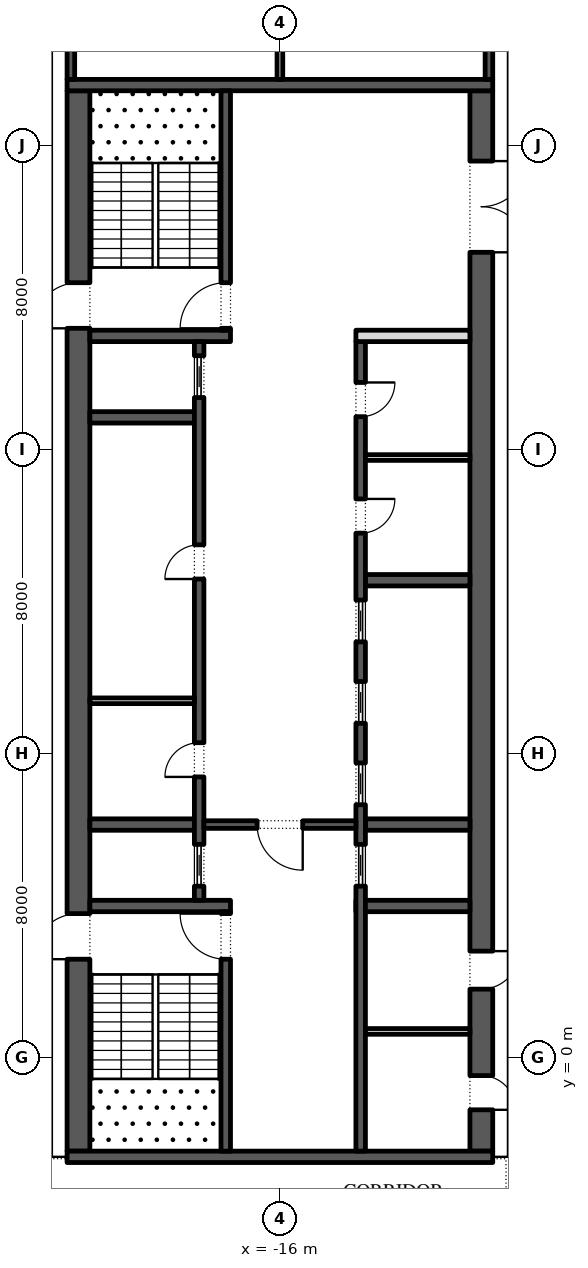
"""IFC4 building model, lengths in metres.
Left out: names, types, materials, properties, quantities, classifications, styles, units other than length and angle.
Written with IfcOpenShell. Run it as: python <this file> out.ifc"""

import sys

from ifc_helpers import new_model, si_unit, direction, frame, frame_2d, origin, place, context, subcontext, project, spatial, rectangle, extrude, element, fill, save


model = new_model("IFC4")
c1 = context("Model", 3, precision=1e-05, world=origin(), true_north=direction((0.0, 1.0)))
c2 = subcontext(c1, "Body", "Model", "MODEL_VIEW")
j1 = project(units=[si_unit("LENGTHUNIT", "METRE"), si_unit("PLANEANGLEUNIT", "RADIAN")], contexts=[c1])
p1 = place(None, origin())
s1 = spatial("IfcSite", under=j1, at=p1, CompositionType="ELEMENT")
p2 = place(p1, origin())
s2 = spatial("IfcBuilding", under=s1, at=p2, CompositionType="ELEMENT")
p3 = place(p2, frame((0.0, 0.0, 293.4)))
s3 = spatial("IfcBuildingStorey", under=s2, at=p3, CompositionType="ELEMENT", Elevation=293.4)
p4 = place(p3, frame((-21.3, -2.45, 0.0), z_axis=(0.0, 0.0, 1.0), x_axis=(0.0, 1.0, 0.0)))
e1 = element("IfcWall", 1, at=p4, inside=s3, PredefinedType="SHEAR", context=c2, shape_type="SweptSolid", body=[
    extrude(rectangle(XDim=27.9, YDim=0.6, at=frame_2d((13.95, 0.0))), origin(), (0.0, 0.0, 1.0), 3.75),
])
p5 = place(p4, frame((5.05, 0.0, 0.0)))
e2 = element("IfcOpeningElement", 2, at=p5, cuts=e1, PredefinedType="OPENING", context=c2, shape_type="SweptSolid", body=[
    extrude(rectangle(XDim=1.2, YDim=2.1, at=frame_2d((0.6, 1.05))), frame((0.0, 0.31, 0.0), z_axis=(0.0, -1.0, 0.0), x_axis=(1.0, 0.0, 0.0)), (0.0, 0.0, 1.0), 0.62),
])
p6 = place(p4, frame((21.65, 0.0, 0.0)))
e3 = element("IfcOpeningElement", 3, at=p6, cuts=e1, PredefinedType="OPENING", context=c2, shape_type="SweptSolid", body=[
    extrude(rectangle(XDim=1.2, YDim=2.1, at=frame_2d((0.6, 1.05))), frame((0.0, 0.31, 0.0), z_axis=(0.0, -1.0, 0.0), x_axis=(1.0, 0.0, 0.0)), (0.0, 0.0, 1.0), 0.62),
])
p7 = place(p3, frame((-10.7, -2.45, 0.0), z_axis=(0.0, 0.0, 1.0), x_axis=(0.0, 1.0, 0.0)))
e4 = element("IfcWall", 4, at=p7, inside=s3, PredefinedType="SHEAR", context=c2, shape_type="SweptSolid", body=[
    extrude(rectangle(XDim=27.9, YDim=0.6, at=frame_2d((13.95, 0.0))), origin(), (0.0, 0.0, 1.0), 3.75),
])
p8 = place(p7, frame((23.65, 0.0, 0.0)))
e5 = element("IfcOpeningElement", 5, at=p8, cuts=e4, PredefinedType="OPENING", context=c2, shape_type="SweptSolid", body=[
    extrude(rectangle(XDim=2.4, YDim=2.1, at=frame_2d((1.2, 1.05))), frame((0.0, 0.31, 0.0), z_axis=(0.0, -1.0, 0.0), x_axis=(1.0, 0.0, 0.0)), (0.0, 0.0, 1.0), 0.62),
])
p9 = place(p7, frame((1.087, 0.0, 0.0)))
e6 = element("IfcOpeningElement", 6, at=p9, cuts=e4, PredefinedType="OPENING", context=c2, shape_type="SweptSolid", body=[
    extrude(rectangle(XDim=0.9, YDim=2.1, at=frame_2d((0.45, 1.05))), frame((0.0, 0.31, 0.0), z_axis=(0.0, -1.0, 0.0), x_axis=(1.0, 0.0, 0.0)), (0.0, 0.0, 1.0), 0.62),
])
p10 = place(p7, frame((4.262, 0.0, 0.0)))
e7 = element("IfcOpeningElement", 7, at=p10, cuts=e4, PredefinedType="OPENING", context=c2, shape_type="SweptSolid", body=[
    extrude(rectangle(XDim=1.0, YDim=2.1, at=frame_2d((0.5, 1.05))), frame((0.0, 0.31, 0.0), z_axis=(0.0, -1.0, 0.0), x_axis=(1.0, 0.0, 0.0)), (0.0, 0.0, 1.0), 0.62),
])
for number, where, z_axis, x_axis in (
    (8, (-21.6, -2.6, 0.0), (0.0, 0.0, 1.0), (1.0, 0.0, 0.0)),
    (9, (-21.6, 25.6, 0.0), (0.0, 0.0, 1.0), (1.0, 0.0, 0.0)),
):
    element("IfcWall", number, at=place(p3, frame(where, z_axis=z_axis, x_axis=x_axis)), inside=s3, PredefinedType="SHEAR", context=c2, shape_type="SweptSolid", body=[
        extrude(rectangle(XDim=11.2, YDim=0.3, at=frame_2d((5.6, 0.0))), origin(), (0.0, 0.0, 1.0), 3.75),
    ])
p11 = place(p3, frame((-21.0, 4.0, 0.0), z_axis=(0.0, 0.0, 1.0), x_axis=(1.0, 0.0, 0.0)))
e10 = element("IfcWall", 10, at=p11, inside=s3, PredefinedType="SHEAR", context=c2, shape_type="SweptSolid", body=[
    extrude(rectangle(XDim=3.7, YDim=0.3, at=frame_2d((1.85, 0.0))), origin(), (0.0, 0.0, 1.0), 3.75),
])
p12 = place(p3, frame((-17.425, -2.45, 0.0), z_axis=(0.0, 0.0, 1.0), x_axis=(0.0, 1.0, 0.0)))
e11 = element("IfcWall", 11, at=p12, inside=s3, PredefinedType="SHEAR", context=c2, shape_type="SweptSolid", body=[
    extrude(rectangle(XDim=6.3, YDim=0.25, at=frame_2d((3.15, 0.0))), origin(), (0.0, 0.0, 1.0), 3.75),
])
p13 = place(p12, frame((5.05, 0.0, 0.0)))
e12 = element("IfcOpeningElement", 12, at=p13, cuts=e11, PredefinedType="OPENING", context=c2, shape_type="SweptSolid", body=[
    extrude(rectangle(XDim=1.2, YDim=2.1, at=frame_2d((0.6, 1.05))), frame((0.0, 0.135, 0.0), z_axis=(0.0, -1.0, 0.0), x_axis=(1.0, 0.0, 0.0)), (0.0, 0.0, 1.0), 0.27),
])
p14 = place(p3, frame((-21.0, 19.0, 0.0), z_axis=(0.0, 0.0, 1.0), x_axis=(1.0, 0.0, 0.0)))
e13 = element("IfcWall", 13, at=p14, inside=s3, PredefinedType="SHEAR", context=c2, shape_type="SweptSolid", body=[
    extrude(rectangle(XDim=3.7, YDim=0.3, at=frame_2d((1.85, 0.0))), origin(), (0.0, 0.0, 1.0), 3.75),
])
p15 = place(p3, frame((-17.425, 19.15, 0.0), z_axis=(0.0, 0.0, 1.0), x_axis=(0.0, 1.0, 0.0)))
e14 = element("IfcWall", 14, at=p15, inside=s3, PredefinedType="SHEAR", context=c2, shape_type="SweptSolid", body=[
    extrude(rectangle(XDim=6.3, YDim=0.25, at=frame_2d((3.15, 0.0))), origin(), (0.0, 0.0, 1.0), 3.75),
])
p16 = place(p15, frame((0.05, 0.0, 0.0)))
e15 = element("IfcOpeningElement", 15, at=p16, cuts=e14, PredefinedType="OPENING", context=c2, shape_type="SweptSolid", body=[
    extrude(rectangle(XDim=1.2, YDim=2.1, at=frame_2d((0.6, 1.05))), frame((0.0, 0.135, 0.0), z_axis=(0.0, -1.0, 0.0), x_axis=(1.0, 0.0, 0.0)), (0.0, 0.0, 1.0), 0.27),
])
for number, where, z_axis, x_axis in (
    (16, (-21.0, 6.143, 0.0), (0.0, 0.0, 1.0), (1.0, 0.0, 0.0)),
    (17, (-21.0, 16.857, 0.0), (0.0, 0.0, 1.0), (1.0, 0.0, 0.0)),
):
    element("IfcWall", number, at=place(p3, frame(where, z_axis=z_axis, x_axis=x_axis)), inside=s3, PredefinedType="SHEAR", context=c2, shape_type="SweptSolid", body=[
        extrude(rectangle(XDim=2.75, YDim=0.3, at=frame_2d((1.375, 0.0))), origin(), (0.0, 0.0, 1.0), 3.75),
    ])
p17 = place(p3, frame((-18.125, 4.15, 0.0), z_axis=(0.0, 0.0, 1.0), x_axis=(0.0, 1.0, 0.0)))
e18 = element("IfcWall", 18, at=p17, inside=s3, PredefinedType="SHEAR", context=c2, shape_type="SweptSolid", body=[
    extrude(rectangle(XDim=14.7, YDim=0.25, at=frame_2d((7.35, 0.0))), origin(), (0.0, 0.0, 1.0), 3.75),
])
p18 = place(p17, frame((3.246, 0.0, 0.0)))
e19 = element("IfcOpeningElement", 19, at=p18, cuts=e18, PredefinedType="OPENING", context=c2, shape_type="SweptSolid", body=[
    extrude(rectangle(XDim=0.9, YDim=2.1, at=frame_2d((0.45, 1.05))), frame((0.0, 0.135, 0.0), z_axis=(0.0, -1.0, 0.0), x_axis=(1.0, 0.0, 0.0)), (0.0, 0.0, 1.0), 0.27),
])
p19 = place(p17, frame((8.454, 0.0, 0.0)))
e20 = element("IfcOpeningElement", 20, at=p19, cuts=e18, PredefinedType="OPENING", context=c2, shape_type="SweptSolid", body=[
    extrude(rectangle(XDim=0.9, YDim=2.1, at=frame_2d((0.45, 1.05))), frame((0.0, 0.135, 0.0), z_axis=(0.0, -1.0, 0.0), x_axis=(1.0, 0.0, 0.0)), (0.0, 0.0, 1.0), 0.27),
])
p20 = place(p17, frame((0.371, 0.0, 0.0)))
e21 = element("IfcOpeningElement", 21, at=p20, cuts=e18, PredefinedType="OPENING", context=c2, shape_type="SweptSolid", body=[
    extrude(rectangle(XDim=1.1, YDim=2.1, at=frame_2d((0.55, 1.05))), frame((0.0, 0.135, 0.0), z_axis=(0.0, -1.0, 0.0), x_axis=(1.0, 0.0, 0.0)), (0.0, 0.0, 1.0), 0.27),
])
p21 = place(p17, frame((13.229, 0.0, 0.0)))
e22 = element("IfcOpeningElement", 22, at=p21, cuts=e18, PredefinedType="OPENING", context=c2, shape_type="SweptSolid", body=[
    extrude(rectangle(XDim=1.1, YDim=2.1, at=frame_2d((0.55, 1.05))), frame((0.0, 0.135, 0.0), z_axis=(0.0, -1.0, 0.0), x_axis=(1.0, 0.0, 0.0)), (0.0, 0.0, 1.0), 0.27),
])
p22 = place(p3, frame((-21.0, 9.4, 0.0), z_axis=(0.0, 0.0, 1.0), x_axis=(1.0, 0.0, 0.0)))
e23 = element("IfcWall", 23, at=p22, inside=s3, PredefinedType="PARTITIONING", context=c2, shape_type="SweptSolid", body=[
    extrude(rectangle(XDim=2.75, YDim=0.15, at=frame_2d((1.375, 0.0))), origin(), (0.0, 0.0, 1.0), 3.75),
])
p23 = place(p3, frame((-14.0, 4.0, 0.0), z_axis=(0.0, 0.0, 1.0), x_axis=(1.0, 0.0, 0.0)))
e24 = element("IfcWall", 24, at=p23, inside=s3, PredefinedType="SHEAR", context=c2, shape_type="SweptSolid", body=[
    extrude(rectangle(XDim=3.0, YDim=0.3, at=frame_2d((1.5, 0.0))), origin(), (0.0, 0.0, 1.0), 3.75),
])
for number, where, z_axis, x_axis in (
    (25, (-13.75, 6.143, 0.0), (0.0, 0.0, 1.0), (1.0, 0.0, 0.0)),
    (26, (-13.75, 12.571, 0.0), (0.0, 0.0, 1.0), (1.0, 0.0, 0.0)),
):
    element("IfcWall", number, at=place(p3, frame(where, z_axis=z_axis, x_axis=x_axis)), inside=s3, PredefinedType="SHEAR", context=c2, shape_type="SweptSolid", body=[
        extrude(rectangle(XDim=2.75, YDim=0.3, at=frame_2d((1.375, 0.0))), origin(), (0.0, 0.0, 1.0), 3.75),
    ])
p24 = place(p3, frame((-13.875, -2.45, 0.0), z_axis=(0.0, 0.0, 1.0), x_axis=(0.0, 1.0, 0.0)))
e27 = element("IfcWall", 27, at=p24, inside=s3, PredefinedType="SHEAR", context=c2, shape_type="SweptSolid", body=[
    extrude(rectangle(XDim=21.3, YDim=0.25, at=frame_2d((10.65, 0.0))), origin(), (0.0, 0.0, 1.0), 3.75),
])
p25 = place(p24, frame((16.261, 0.0, 0.0)))
e28 = element("IfcOpeningElement", 28, at=p25, cuts=e27, PredefinedType="OPENING", context=c2, shape_type="SweptSolid", body=[
    extrude(rectangle(XDim=0.9, YDim=2.1, at=frame_2d((0.45, 1.05))), frame((0.0, 0.135, 0.0), z_axis=(0.0, -1.0, 0.0), x_axis=(1.0, 0.0, 0.0)), (0.0, 0.0, 1.0), 0.27),
])
p26 = place(p24, frame((19.325, 0.0, 0.0)))
e29 = element("IfcOpeningElement", 29, at=p26, cuts=e27, PredefinedType="OPENING", context=c2, shape_type="SweptSolid", body=[
    extrude(rectangle(XDim=0.9, YDim=2.1, at=frame_2d((0.45, 1.05))), frame((0.0, 0.135, 0.0), z_axis=(0.0, -1.0, 0.0), x_axis=(1.0, 0.0, 0.0)), (0.0, 0.0, 1.0), 0.27),
])
p27 = place(p24, frame((6.971, 0.0, 0.0)))
e30 = element("IfcOpeningElement", 30, at=p27, cuts=e27, PredefinedType="OPENING", context=c2, shape_type="SweptSolid", body=[
    extrude(rectangle(XDim=1.1, YDim=2.1, at=frame_2d((0.55, 1.05))), frame((0.0, 0.135, 0.0), z_axis=(0.0, -1.0, 0.0), x_axis=(1.0, 0.0, 0.0)), (0.0, 0.0, 1.0), 0.27),
])
p28 = place(p24, frame((9.114, 0.0, 0.0)))
e31 = element("IfcOpeningElement", 31, at=p28, cuts=e27, PredefinedType="OPENING", context=c2, shape_type="SweptSolid", body=[
    extrude(rectangle(XDim=1.1, YDim=2.1, at=frame_2d((0.55, 1.05))), frame((0.0, 0.135, 0.0), z_axis=(0.0, -1.0, 0.0), x_axis=(1.0, 0.0, 0.0)), (0.0, 0.0, 1.0), 0.27),
])
p29 = place(p24, frame((11.257, 0.0, 0.0)))
e32 = element("IfcOpeningElement", 32, at=p29, cuts=e27, PredefinedType="OPENING", context=c2, shape_type="SweptSolid", body=[
    extrude(rectangle(XDim=1.1, YDim=2.1, at=frame_2d((0.55, 1.05))), frame((0.0, 0.135, 0.0), z_axis=(0.0, -1.0, 0.0), x_axis=(1.0, 0.0, 0.0)), (0.0, 0.0, 1.0), 0.27),
])
p30 = place(p24, frame((13.4, 0.0, 0.0)))
e33 = element("IfcOpeningElement", 33, at=p30, cuts=e27, PredefinedType="OPENING", context=c2, shape_type="SweptSolid", body=[
    extrude(rectangle(XDim=1.1, YDim=2.1, at=frame_2d((0.55, 1.05))), frame((0.0, 0.135, 0.0), z_axis=(0.0, -1.0, 0.0), x_axis=(1.0, 0.0, 0.0)), (0.0, 0.0, 1.0), 0.27),
])
p31 = place(p3, frame((-14.0, 19.0, 0.0), z_axis=(0.0, 0.0, 1.0), x_axis=(1.0, 0.0, 0.0)))
e34 = element("IfcWall", 34, at=p31, inside=s3, PredefinedType="PARTITIONING", context=c2, shape_type="SweptSolid", body=[
    extrude(rectangle(XDim=3.0, YDim=0.3, at=frame_2d((1.5, 0.0))), origin(), (0.0, 0.0, 1.0), 3.75),
])
p32 = place(p3, frame((-13.75, 15.8, 0.0), z_axis=(0.0, 0.0, 1.0), x_axis=(1.0, 0.0, 0.0)))
e35 = element("IfcWall", 35, at=p32, inside=s3, PredefinedType="PARTITIONING", context=c2, shape_type="SweptSolid", body=[
    extrude(rectangle(XDim=2.75, YDim=0.15, at=frame_2d((1.375, 0.0))), origin(), (0.0, 0.0, 1.0), 3.75),
])
p33 = place(p3, frame((-18.0, 6.143, 0.0), z_axis=(0.0, 0.0, 1.0), x_axis=(1.0, 0.0, 0.0)))
e36 = element("IfcWall", 36, at=p33, inside=s3, PredefinedType="SHEAR", context=c2, shape_type="SweptSolid", body=[
    extrude(rectangle(XDim=4.0, YDim=0.2, at=frame_2d((2.0, 0.0))), origin(), (0.0, 0.0, 1.0), 3.75),
])
p34 = place(p33, frame((1.4, 0.0, 0.0)))
e37 = element("IfcOpeningElement", 37, at=p34, cuts=e36, PredefinedType="OPENING", context=c2, shape_type="SweptSolid", body=[
    extrude(rectangle(XDim=1.2, YDim=2.1, at=frame_2d((0.6, 1.05))), frame((0.0, 0.11, 0.0), z_axis=(0.0, -1.0, 0.0), x_axis=(1.0, 0.0, 0.0)), (0.0, 0.0, 1.0), 0.22),
])
p35 = place(p3, frame((-13.75, 0.7, 0.0), z_axis=(0.0, 0.0, 1.0), x_axis=(1.0, 0.0, 0.0)))
e38 = element("IfcWall", 38, at=p35, inside=s3, PredefinedType="PARTITIONING", context=c2, shape_type="SweptSolid", body=[
    extrude(rectangle(XDim=2.75, YDim=0.15, at=frame_2d((1.375, 0.0))), origin(), (0.0, 0.0, 1.0), 3.75),
])
p36 = place(p3, frame((-21.5, 25.75, 0.0), z_axis=(0.0, 0.0, 1.0), x_axis=(0.0, 1.0, 0.0)))
e39 = element("IfcWall", 39, at=p36, inside=s3, PredefinedType="SHEAR", context=c2, shape_type="SweptSolid", body=[
    extrude(rectangle(XDim=4.75, YDim=0.2, at=frame_2d((2.375, 0.0))), origin(), (0.0, 0.0, 1.0), 3.75),
])
p37 = place(p36, frame((1.925, 0.0, 0.0)))
e40 = element("IfcOpeningElement", 40, at=p37, cuts=e39, PredefinedType="OPENING", context=c2, shape_type="SweptSolid", body=[
    extrude(rectangle(XDim=0.9, YDim=2.1, at=frame_2d((0.45, 1.05))), frame((0.0, 0.11, 0.0), z_axis=(0.0, -1.0, 0.0), x_axis=(1.0, 0.0, 0.0)), (0.0, 0.0, 1.0), 0.22),
])
p38 = place(p3, frame((-10.5, 25.75, 0.0), z_axis=(0.0, 0.0, 1.0), x_axis=(0.0, 1.0, 0.0)))
e41 = element("IfcWall", 41, at=p38, inside=s3, PredefinedType="SHEAR", context=c2, shape_type="SweptSolid", body=[
    extrude(rectangle(XDim=4.75, YDim=0.2, at=frame_2d((2.375, 0.0))), origin(), (0.0, 0.0, 1.0), 3.75),
])
p39 = place(p38, frame((1.925, 0.0, 0.0)))
e42 = element("IfcOpeningElement", 42, at=p39, cuts=e41, PredefinedType="OPENING", context=c2, shape_type="SweptSolid", body=[
    extrude(rectangle(XDim=0.9, YDim=2.1, at=frame_2d((0.45, 1.05))), frame((0.0, 0.11, 0.0), z_axis=(0.0, -1.0, 0.0), x_axis=(1.0, 0.0, 0.0)), (0.0, 0.0, 1.0), 0.22),
])
p40 = place(p3, frame((-16.0, 25.75, 0.0), z_axis=(0.0, 0.0, 1.0), x_axis=(0.0, 1.0, 0.0)))
e43 = element("IfcWall", 43, at=p40, inside=s3, PredefinedType="PARTITIONING", context=c2, shape_type="SweptSolid", body=[
    extrude(rectangle(XDim=4.75, YDim=0.15, at=frame_2d((2.375, 0.0))), origin(), (0.0, 0.0, 1.0), 3.75),
])
p41 = place(p18, origin())
e44 = element("IfcDoor", 44, at=p41, inside=s3, OperationType="SINGLE_SWING_RIGHT", PredefinedType="DOOR", context=c2, shape_type="SweptSolid", body=[
    extrude(rectangle(XDim=0.9, YDim=2.1, at=frame_2d((0.45, 1.05))), frame((0.0, 0.125, 0.0), z_axis=(0.0, -1.0, 0.0), x_axis=(1.0, 0.0, 0.0)), (0.0, 0.0, 1.0), 0.05),
])
fill(e19, e44)
p42 = place(p19, origin())
e45 = element("IfcDoor", 45, at=p42, inside=s3, OperationType="SINGLE_SWING_RIGHT", PredefinedType="DOOR", context=c2, shape_type="SweptSolid", body=[
    extrude(rectangle(XDim=0.9, YDim=2.1, at=frame_2d((0.45, 1.05))), frame((0.0, 0.125, 0.0), z_axis=(0.0, -1.0, 0.0), x_axis=(1.0, 0.0, 0.0)), (0.0, 0.0, 1.0), 0.05),
])
fill(e20, e45)
p43 = place(p20, origin())
e46 = element("IfcDoor", 46, at=p43, inside=s3, OperationType="SLIDING_TO_LEFT", PredefinedType="DOOR", context=c2, shape_type="SweptSolid", body=[
    extrude(rectangle(XDim=1.1, YDim=2.1, at=frame_2d((0.55, 1.05))), frame((0.0, 0.025, 0.0), z_axis=(0.0, -1.0, 0.0), x_axis=(1.0, 0.0, 0.0)), (0.0, 0.0, 1.0), 0.05),
])
fill(e21, e46)
p44 = place(p21, origin())
e47 = element("IfcDoor", 47, at=p44, inside=s3, OperationType="SLIDING_TO_LEFT", PredefinedType="DOOR", context=c2, shape_type="SweptSolid", body=[
    extrude(rectangle(XDim=1.1, YDim=2.1, at=frame_2d((0.55, 1.05))), frame((0.0, 0.025, 0.0), z_axis=(0.0, -1.0, 0.0), x_axis=(1.0, 0.0, 0.0)), (0.0, 0.0, 1.0), 0.05),
])
fill(e22, e47)
p45 = place(p25, frame((0.9, -0.2, 0.0), z_axis=(0.0, 0.0, 1.0), x_axis=(-1.0, 0.0, 0.0)))
e48 = element("IfcDoor", 48, at=p45, inside=s3, OperationType="SINGLE_SWING_RIGHT", PredefinedType="DOOR", context=c2, shape_type="SweptSolid", body=[
    extrude(rectangle(XDim=0.9, YDim=2.1, at=frame_2d((0.45, 1.05))), frame((0.0, -0.075, 0.0), z_axis=(0.0, -1.0, 0.0), x_axis=(1.0, 0.0, 0.0)), (0.0, 0.0, 1.0), 0.05),
])
fill(e28, e48)
p46 = place(p26, frame((0.9, -0.2, 0.0), z_axis=(0.0, 0.0, 1.0), x_axis=(-1.0, 0.0, 0.0)))
e49 = element("IfcDoor", 49, at=p46, inside=s3, OperationType="SINGLE_SWING_RIGHT", PredefinedType="DOOR", context=c2, shape_type="SweptSolid", body=[
    extrude(rectangle(XDim=0.9, YDim=2.1, at=frame_2d((0.45, 1.05))), frame((0.0, -0.075, 0.0), z_axis=(0.0, -1.0, 0.0), x_axis=(1.0, 0.0, 0.0)), (0.0, 0.0, 1.0), 0.05),
])
fill(e29, e49)
p47 = place(p27, origin())
e50 = element("IfcDoor", 50, at=p47, inside=s3, OperationType="SLIDING_TO_LEFT", PredefinedType="DOOR", context=c2, shape_type="SweptSolid", body=[
    extrude(rectangle(XDim=1.1, YDim=2.1, at=frame_2d((0.55, 1.05))), frame((0.0, 0.025, 0.0), z_axis=(0.0, -1.0, 0.0), x_axis=(1.0, 0.0, 0.0)), (0.0, 0.0, 1.0), 0.05),
])
fill(e30, e50)
p48 = place(p28, origin())
e51 = element("IfcDoor", 51, at=p48, inside=s3, OperationType="SLIDING_TO_LEFT", PredefinedType="DOOR", context=c2, shape_type="SweptSolid", body=[
    extrude(rectangle(XDim=1.1, YDim=2.1, at=frame_2d((0.55, 1.05))), frame((0.0, 0.025, 0.0), z_axis=(0.0, -1.0, 0.0), x_axis=(1.0, 0.0, 0.0)), (0.0, 0.0, 1.0), 0.05),
])
fill(e31, e51)
p49 = place(p29, origin())
e52 = element("IfcDoor", 52, at=p49, inside=s3, OperationType="SLIDING_TO_LEFT", PredefinedType="DOOR", context=c2, shape_type="SweptSolid", body=[
    extrude(rectangle(XDim=1.1, YDim=2.1, at=frame_2d((0.55, 1.05))), frame((0.0, 0.025, 0.0), z_axis=(0.0, -1.0, 0.0), x_axis=(1.0, 0.0, 0.0)), (0.0, 0.0, 1.0), 0.05),
])
fill(e32, e52)
p50 = place(p30, origin())
e53 = element("IfcDoor", 53, at=p50, inside=s3, OperationType="SLIDING_TO_LEFT", PredefinedType="DOOR", context=c2, shape_type="SweptSolid", body=[
    extrude(rectangle(XDim=1.1, YDim=2.1, at=frame_2d((0.55, 1.05))), frame((0.0, 0.025, 0.0), z_axis=(0.0, -1.0, 0.0), x_axis=(1.0, 0.0, 0.0)), (0.0, 0.0, 1.0), 0.05),
])
fill(e33, e53)
p51 = place(p34, frame((1.2, 0.0, 0.0), z_axis=(0.0, 0.0, 1.0), x_axis=(-1.0, 0.0, 0.0)))
e54 = element("IfcDoor", 54, at=p51, inside=s3, OperationType="SINGLE_SWING_RIGHT", PredefinedType="DOOR", context=c2, shape_type="SweptSolid", body=[
    extrude(rectangle(XDim=1.2, YDim=2.1, at=frame_2d((0.6, 1.05))), frame((0.0, 0.025, 0.0), z_axis=(0.0, -1.0, 0.0), x_axis=(1.0, 0.0, 0.0)), (0.0, 0.0, 1.0), 0.05),
])
fill(e37, e54)
p52 = place(p8, frame((2.4, 0.0, 0.0), z_axis=(0.0, 0.0, 1.0), x_axis=(-1.0, 0.0, 0.0)))
e55 = element("IfcDoor", 55, at=p52, inside=s3, OperationType="DOUBLE_DOOR_SINGLE_SWING", PredefinedType="DOOR", context=c2, shape_type="SweptSolid", body=[
    extrude(rectangle(XDim=2.4, YDim=2.1, at=frame_2d((1.2, 1.05))), frame((0.0, 0.025, 0.0), z_axis=(0.0, -1.0, 0.0), x_axis=(1.0, 0.0, 0.0)), (0.0, 0.0, 1.0), 0.05),
])
fill(e5, e55)
p53 = place(p13, origin())
e56 = element("IfcDoor", 56, at=p53, inside=s3, OperationType="SINGLE_SWING_LEFT", PredefinedType="DOOR", context=c2, shape_type="SweptSolid", body=[
    extrude(rectangle(XDim=1.2, YDim=2.1, at=frame_2d((0.6, 1.05))), frame((0.0, 0.025, 0.0), z_axis=(0.0, -1.0, 0.0), x_axis=(1.0, 0.0, 0.0)), (0.0, 0.0, 1.0), 0.05),
])
fill(e12, e56)
p54 = place(p5, origin())
e57 = element("IfcDoor", 57, at=p54, inside=s3, OperationType="SINGLE_SWING_RIGHT", PredefinedType="DOOR", context=c2, shape_type="SweptSolid", body=[
    extrude(rectangle(XDim=1.2, YDim=2.1, at=frame_2d((0.6, 1.05))), frame((0.0, 0.025, 0.0), z_axis=(0.0, -1.0, 0.0), x_axis=(1.0, 0.0, 0.0)), (0.0, 0.0, 1.0), 0.05),
])
fill(e2, e57)
p55 = place(p16, origin())
e58 = element("IfcDoor", 58, at=p55, inside=s3, OperationType="SINGLE_SWING_RIGHT", PredefinedType="DOOR", context=c2, shape_type="SweptSolid", body=[
    extrude(rectangle(XDim=1.2, YDim=2.1, at=frame_2d((0.6, 1.05))), frame((0.0, 0.025, 0.0), z_axis=(0.0, -1.0, 0.0), x_axis=(1.0, 0.0, 0.0)), (0.0, 0.0, 1.0), 0.05),
])
fill(e15, e58)
p56 = place(p6, origin())
e59 = element("IfcDoor", 59, at=p56, inside=s3, OperationType="SINGLE_SWING_RIGHT", PredefinedType="DOOR", context=c2, shape_type="SweptSolid", body=[
    extrude(rectangle(XDim=1.2, YDim=2.1, at=frame_2d((0.6, 1.05))), frame((0.0, 0.025, 0.0), z_axis=(0.0, -1.0, 0.0), x_axis=(1.0, 0.0, 0.0)), (0.0, 0.0, 1.0), 0.05),
])
fill(e3, e59)
p57 = place(p9, frame((0.9, 0.55, 0.0), z_axis=(0.0, 0.0, 1.0), x_axis=(-1.0, 0.0, 0.0)))
e60 = element("IfcDoor", 60, at=p57, inside=s3, OperationType="SINGLE_SWING_LEFT", PredefinedType="DOOR", context=c2, shape_type="SweptSolid", body=[
    extrude(rectangle(XDim=0.9, YDim=2.1, at=frame_2d((0.45, 1.05))), frame((0.0, 0.3, 0.0), z_axis=(0.0, -1.0, 0.0), x_axis=(1.0, 0.0, 0.0)), (0.0, 0.0, 1.0), 0.05),
])
fill(e6, e60)
p58 = place(p10, frame((1.0, 0.55, 0.0), z_axis=(0.0, 0.0, 1.0), x_axis=(-1.0, 0.0, 0.0)))
e61 = element("IfcDoor", 61, at=p58, inside=s3, OperationType="SINGLE_SWING_RIGHT", PredefinedType="DOOR", context=c2, shape_type="SweptSolid", body=[
    extrude(rectangle(XDim=1.0, YDim=2.1, at=frame_2d((0.5, 1.05))), frame((0.0, 0.3, 0.0), z_axis=(0.0, -1.0, 0.0), x_axis=(1.0, 0.0, 0.0)), (0.0, 0.0, 1.0), 0.05),
])
fill(e7, e61)
save(model, sys.argv[1])
